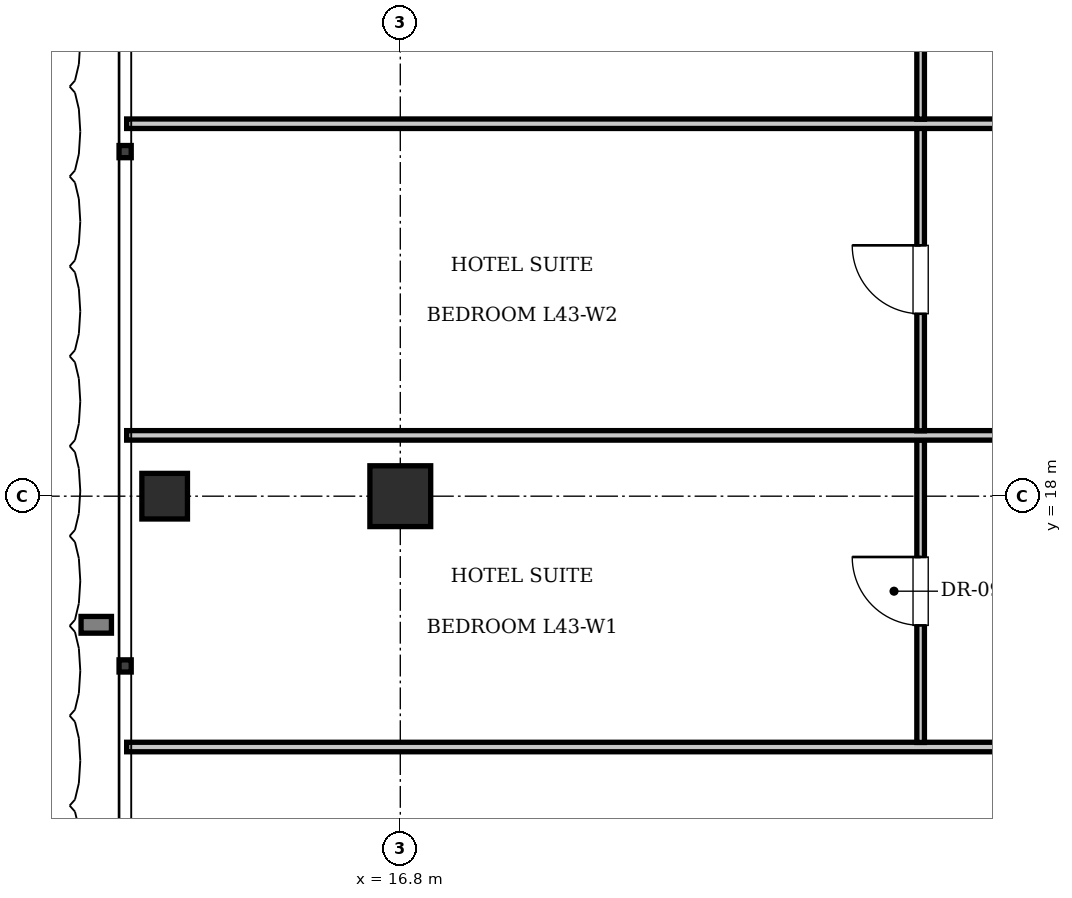
"""IFC4 building model, lengths in metres.
Left out: names, types, materials, properties, quantities, classifications, styles, units other than length and angle.
Written with IfcOpenShell. Run it as: python <this file> out.ifc"""

import sys

from ifc_helpers import new_model, si_unit, direction, frame, frame_2d, origin, origin_2d, place, context, subcontext, project, spatial, rectangle, i_section, extrude, element, fill, save


model = new_model("IFC4")
c1 = context("Model", 3, precision=1e-05, world=origin(), true_north=direction((0.0, 1.0)))
c2 = subcontext(c1, "Body", "Model", "MODEL_VIEW")
j1 = project(units=[si_unit("LENGTHUNIT", "METRE"), si_unit("PLANEANGLEUNIT", "RADIAN")], contexts=[c1])
p1 = place(None, origin())
s1 = spatial("IfcSite", under=j1, at=p1, CompositionType="ELEMENT")
p2 = place(p1, origin())
s2 = spatial("IfcBuilding", under=s1, at=p2, CompositionType="ELEMENT")
p3 = place(p2, frame((0.0, 0.0, 177.45)))
s3 = spatial("IfcBuildingStorey", under=s2, at=p3, CompositionType="ELEMENT", Elevation=177.45)
p4 = place(p3, frame((16.8, 18.0, 0.0), z_axis=(0.0, 0.0, 1.0), x_axis=(1.0, 0.0, 0.0)))
e1 = element("IfcColumn", 1, at=p4, inside=s3, PredefinedType="COLUMN", context=c2, shape_type="SweptSolid", body=[
    extrude(rectangle(XDim=0.8, YDim=0.8, at=origin_2d()), origin(), (0.0, 0.0, 1.0), 3.85),
])
p5 = place(p3, frame((13.7, 18.0, 0.0), z_axis=(0.0, 0.0, 1.0), x_axis=(1.0, 0.0, 0.0)))
e2 = element("IfcColumn", 2, at=p5, inside=s3, PredefinedType="COLUMN", context=c2, shape_type="SweptSolid", body=[
    extrude(i_section(OverallWidth=0.6, OverallDepth=0.6, WebThickness=0.025, FlangeThickness=0.038, at=origin_2d()), origin(), (0.0, 0.0, 1.0), 3.85),
])
p6 = place(p3, frame((13.2, 14.7, 0.0), z_axis=(0.0, 0.0, 1.0), x_axis=(1.0, 0.0, 0.0)))
e3 = element("IfcWall", 3, at=p6, inside=s3, PredefinedType="PARTITIONING", context=c2, shape_type="SweptSolid", body=[
    extrude(rectangle(XDim=24.32, YDim=0.125, at=frame_2d((12.16, 0.0))), origin(), (0.0, 0.0, 1.0), 3.61),
])
p7 = place(p3, frame((23.646, 14.76, 0.0), z_axis=(0.0, 0.0, 1.0), x_axis=(0.0, 1.0, 0.0)))
e4 = element("IfcWall", 4, at=p7, inside=s3, PredefinedType="PARTITIONING", context=c2, shape_type="SweptSolid", body=[
    extrude(rectangle(XDim=3.98, YDim=0.1, at=frame_2d((1.99, 0.0))), origin(), (0.0, 0.0, 1.0), 3.61),
])
p8 = place(p7, frame((1.54, 0.0, 0.0)))
e5 = element("IfcOpeningElement", 5, at=p8, cuts=e4, PredefinedType="OPENING", context=c2, shape_type="SweptSolid", body=[
    extrude(rectangle(XDim=0.9, YDim=2.1, at=frame_2d((0.45, 1.05))), frame((0.0, 0.06, 0.0), z_axis=(0.0, -1.0, 0.0), x_axis=(1.0, 0.0, 0.0)), (0.0, 0.0, 1.0), 0.12),
])
p9 = place(p3, frame((13.2, 18.8, 0.0), z_axis=(0.0, 0.0, 1.0), x_axis=(1.0, 0.0, 0.0)))
e6 = element("IfcWall", 6, at=p9, inside=s3, PredefinedType="PARTITIONING", context=c2, shape_type="SweptSolid", body=[
    extrude(rectangle(XDim=24.32, YDim=0.125, at=frame_2d((12.16, 0.0))), origin(), (0.0, 0.0, 1.0), 3.61),
])
p10 = place(p3, frame((23.646, 18.86, 0.0), z_axis=(0.0, 0.0, 1.0), x_axis=(0.0, 1.0, 0.0)))
e7 = element("IfcWall", 7, at=p10, inside=s3, PredefinedType="PARTITIONING", context=c2, shape_type="SweptSolid", body=[
    extrude(rectangle(XDim=3.98, YDim=0.1, at=frame_2d((1.99, 0.0))), origin(), (0.0, 0.0, 1.0), 3.61),
])
p11 = place(p10, frame((1.54, 0.0, 0.0)))
e8 = element("IfcOpeningElement", 8, at=p11, cuts=e7, PredefinedType="OPENING", context=c2, shape_type="SweptSolid", body=[
    extrude(rectangle(XDim=0.9, YDim=2.1, at=frame_2d((0.45, 1.05))), frame((0.0, 0.06, 0.0), z_axis=(0.0, -1.0, 0.0), x_axis=(1.0, 0.0, 0.0)), (0.0, 0.0, 1.0), 0.12),
])
p12 = place(p3, frame((13.2, 22.9, 0.0), z_axis=(0.0, 0.0, 1.0), x_axis=(1.0, 0.0, 0.0)))
e9 = element("IfcWall", 9, at=p12, inside=s3, PredefinedType="PARTITIONING", context=c2, shape_type="SweptSolid", body=[
    extrude(rectangle(XDim=24.32, YDim=0.125, at=frame_2d((12.16, 0.0))), origin(), (0.0, 0.0, 1.0), 3.61),
])
p13 = place(p3, frame((23.646, 22.96, 0.0), z_axis=(0.0, 0.0, 1.0), x_axis=(0.0, 1.0, 0.0)))
e10 = element("IfcWall", 10, at=p13, inside=s3, PredefinedType="PARTITIONING", context=c2, shape_type="SweptSolid", body=[
    extrude(rectangle(XDim=3.98, YDim=0.1, at=frame_2d((1.99, 0.0))), origin(), (0.0, 0.0, 1.0), 3.61),
])
p14 = place(p13, frame((1.54, 0.0, 0.0)))
e11 = element("IfcOpeningElement", 11, at=p14, cuts=e10, PredefinedType="OPENING", context=c2, shape_type="SweptSolid", body=[
    extrude(rectangle(XDim=0.9, YDim=2.1, at=frame_2d((0.45, 1.05))), frame((0.0, 0.06, 0.0), z_axis=(0.0, -1.0, 0.0), x_axis=(1.0, 0.0, 0.0)), (0.0, 0.0, 1.0), 0.12),
])
p15 = place(p8, origin())
e12 = element("IfcDoor", 12, at=p15, inside=s3, OperationType="SINGLE_SWING_RIGHT", PredefinedType="DOOR", context=c2, shape_type="SweptSolid", body=[
    extrude(rectangle(XDim=0.9, YDim=2.1, at=frame_2d((0.45, 1.05))), frame((0.0, 0.025, 0.0), z_axis=(0.0, -1.0, 0.0), x_axis=(1.0, 0.0, 0.0)), (0.0, 0.0, 1.0), 0.05),
])
fill(e5, e12)
p16 = place(p11, origin())
e13 = element("IfcDoor", 13, at=p16, inside=s3, OperationType="SINGLE_SWING_RIGHT", PredefinedType="DOOR", context=c2, shape_type="SweptSolid", body=[
    extrude(rectangle(XDim=0.9, YDim=2.1, at=frame_2d((0.45, 1.05))), frame((0.0, 0.025, 0.0), z_axis=(0.0, -1.0, 0.0), x_axis=(1.0, 0.0, 0.0)), (0.0, 0.0, 1.0), 0.05),
])
fill(e8, e13)
save(model, sys.argv[1])
